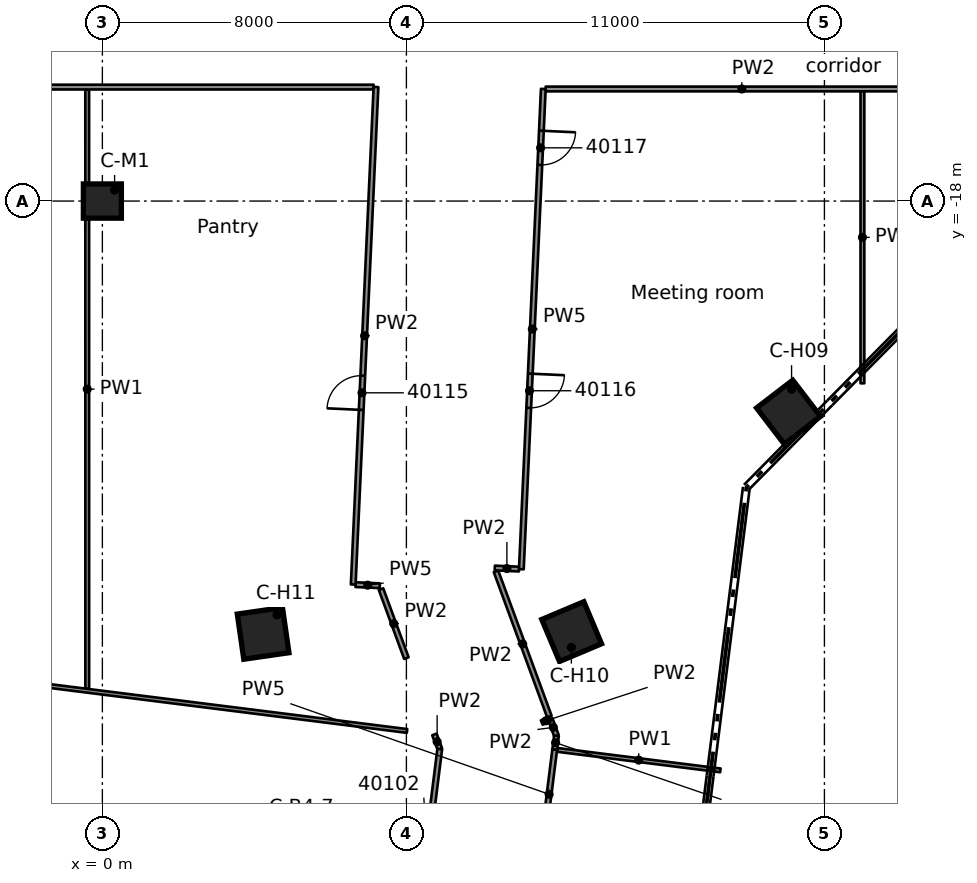
"""IFC4 building model, lengths in metres.
Left out: names, types, materials, properties, quantities, classifications, styles, units other than length and angle.
Written with IfcOpenShell. Run it as: python <this file> out.ifc"""

import sys

from ifc_helpers import new_model, si_unit, direction, frame, frame_2d, origin, origin_2d, place, context, subcontext, project, spatial, rectangle, extrude, element, fill, save


model = new_model("IFC4")
c1 = context("Model", 3, precision=1e-05, world=origin(), true_north=direction((0.0, 1.0)))
c2 = subcontext(c1, "Body", "Model", "MODEL_VIEW")
j1 = project(units=[si_unit("LENGTHUNIT", "METRE"), si_unit("PLANEANGLEUNIT", "RADIAN")], contexts=[c1])
p1 = place(None, origin())
s1 = spatial("IfcSite", under=j1, at=p1, CompositionType="ELEMENT")
p2 = place(p1, origin())
s2 = spatial("IfcBuilding", under=s1, at=p2, CompositionType="ELEMENT")
p3 = place(p2, frame((0.0, 0.0, 199.1)))
s3 = spatial("IfcBuildingStorey", under=s2, at=p3, CompositionType="ELEMENT", Elevation=199.1)
for number, where, z_axis, x_axis in (
    (1, (18.056, -23.555, 0.0), (0.0, 0.0, 1.0), (0.608, -0.794, 0.0)),
    (2, (12.349, -29.329, 0.0), (0.0, 0.0, 1.0), (0.388, -0.922, 0.0)),
    (3, (4.23, -29.376, 0.0), (0.0, 0.0, 1.0), (0.143, -0.99, 0.0)),
):
    element("IfcColumn", number, at=place(p3, frame(where, z_axis=z_axis, x_axis=x_axis)), inside=s3, PredefinedType="COLUMN", context=c2, shape_type="SweptSolid", body=[
        extrude(rectangle(XDim=1.2, YDim=1.2, at=origin_2d()), origin(), (0.0, 0.0, 1.0), 3.5),
    ])
p4 = place(p3, frame((0.0, -18.0, 0.0), z_axis=(0.0, 0.0, 1.0), x_axis=(1.0, 0.0, 0.0)))
e4 = element("IfcColumn", 4, at=p4, inside=s3, PredefinedType="COLUMN", context=c2, shape_type="SweptSolid", body=[
    extrude(rectangle(XDim=1.0, YDim=0.9, at=origin_2d()), origin(), (0.0, 0.0, 1.0), 3.5),
])
p5 = place(p3, frame((-0.399, -15.062, 0.0), z_axis=(0.0, 0.0, 1.0), x_axis=(6.1913754e-05, -0.999999998083, 0.0)))
e5 = element("IfcWall", 5, at=p5, inside=s3, PredefinedType="PARTITIONING", context=c2, shape_type="SweptSolid", body=[
    extrude(rectangle(XDim=15.773, YDim=0.1, at=frame_2d((7.886, 0.0))), origin(), (0.0, 0.0, 1.0), 3.03),
])
p6 = place(p3, frame((7.332, -28.21, 0.0), z_axis=(0.0, 0.0, 1.0), x_axis=(0.34522583337, -0.938519644959, 0.0)))
e6 = element("IfcWall", 6, at=p6, inside=s3, PredefinedType="PARTITIONING", context=c2, shape_type="SweptSolid", body=[
    extrude(rectangle(XDim=1.935, YDim=0.125, at=frame_2d((0.967, 0.0))), origin(), (0.0, 0.0, 1.0), 3.03),
])
p7 = place(p3, frame((8.738, -32.034, 0.0), z_axis=(0.0, 0.0, 1.0), x_axis=(0.344934891115, -0.938626614204, 0.0)))
e7 = element("IfcWall", 7, at=p7, inside=s3, PredefinedType="PARTITIONING", context=c2, shape_type="SweptSolid", body=[
    extrude(rectangle(XDim=0.411, YDim=0.125, at=frame_2d((0.206, 0.0))), origin(), (0.0, 0.0, 1.0), 3.03),
])
p8 = place(p3, frame((10.358, -27.743, 0.0), z_axis=(0.0, 0.0, 1.0), x_axis=(0.34503845991, -0.938588547332, 0.0)))
e8 = element("IfcWall", 8, at=p8, inside=s3, PredefinedType="PARTITIONING", context=c2, shape_type="SweptSolid", body=[
    extrude(rectangle(XDim=4.072, YDim=0.125, at=frame_2d((2.036, 0.0))), origin(), (0.0, 0.0, 1.0), 3.03),
])
p9 = place(p3, frame((11.786, -31.628, 0.0), z_axis=(0.0, 0.0, 1.0), x_axis=(0.346065449672, -0.938210373287, 0.0)))
e9 = element("IfcWall", 9, at=p9, inside=s3, PredefinedType="PARTITIONING", context=c2, shape_type="SweptSolid", body=[
    extrude(rectangle(XDim=0.471, YDim=0.125, at=frame_2d((0.236, 0.0))), origin(), (0.0, 0.0, 1.0), 3.03),
])
p10 = place(p3, frame((-16.315, -28.884, 0.0), z_axis=(0.0, 0.0, 1.0), x_axis=(0.992189406065, -0.124740460527, 0.0)))
e10 = element("IfcWall", 10, at=p10, inside=s3, PredefinedType="PARTITIONING", context=c2, shape_type="SweptSolid", body=[
    extrude(rectangle(XDim=24.524, YDim=0.1, at=frame_2d((12.262, 0.0))), origin(), (0.0, 0.0, 1.0), 3.03),
])
p11 = place(p3, frame((11.965, -32.44, 0.0), z_axis=(0.0, 0.0, 1.0), x_axis=(0.992194392082, -0.124700795187, 0.0)))
e11 = element("IfcWall", 11, at=p11, inside=s3, PredefinedType="PARTITIONING", context=c2, shape_type="SweptSolid", body=[
    extrude(rectangle(XDim=4.331, YDim=0.1, at=frame_2d((2.165, 0.0))), origin(), (0.0, 0.0, 1.0), 3.03),
])
p12 = place(p3, frame((6.663, -28.093, 0.0), z_axis=(0.0, 0.0, 1.0), x_axis=(0.998961422795, -0.045563974439, 0.0)))
e12 = element("IfcWall", 12, at=p12, inside=s3, PredefinedType="PARTITIONING", context=c2, shape_type="SweptSolid", body=[
    extrude(rectangle(XDim=0.638, YDim=0.125, at=frame_2d((0.319, 0.0))), origin(), (0.0, 0.0, 1.0), 2.395),
])
p13 = place(p3, frame((10.326, -27.655, 0.0), z_axis=(0.0, 0.0, 1.0), x_axis=(0.998961422795, -0.045563974439, 0.0)))
e13 = element("IfcWall", 13, at=p13, inside=s3, PredefinedType="PARTITIONING", context=c2, shape_type="SweptSolid", body=[
    extrude(rectangle(XDim=0.638, YDim=0.125, at=frame_2d((0.319, 0.0))), origin(), (0.0, 0.0, 1.0), 3.03),
])
p14 = place(p3, frame((11.665, -15.051, 0.0), z_axis=(0.0, 0.0, 1.0), x_axis=(1.0, 0.0, 0.0)))
e14 = element("IfcWall", 14, at=p14, inside=s3, PredefinedType="PARTITIONING", context=c2, shape_type="SweptSolid", body=[
    extrude(rectangle(XDim=10.323, YDim=0.125, at=frame_2d((5.162, 0.0))), origin(), (0.0, 0.0, 1.0), 3.03),
])
p15 = place(p3, frame((7.138, -15.001, 0.0), z_axis=(0.0, 0.0, 1.0), x_axis=(-1.0, 0.0, 0.0)))
e15 = element("IfcWall", 15, at=p15, inside=s3, PredefinedType="PARTITIONING", context=c2, shape_type="SweptSolid", body=[
    extrude(rectangle(XDim=18.128, YDim=0.125, at=frame_2d((9.064, 0.0))), origin(), (0.0, 0.0, 1.0), 3.03),
])
p16 = place(p15, frame((10.886, 0.0, 0.0)))
e16 = element("IfcOpeningElement", 16, at=p16, cuts=e15, PredefinedType="OPENING", context=c2, shape_type="SweptSolid", body=[
    extrude(rectangle(XDim=0.9, YDim=2.1, at=frame_2d((0.45, 1.05))), frame((0.0, 0.073, 0.0), z_axis=(0.0, -1.0, 0.0), x_axis=(1.0, 0.0, 0.0)), (0.0, 0.0, 1.0), 0.145),
])
p17 = place(p3, frame((11.563, -31.721, 0.0), z_axis=(0.0, 0.0, 1.0), x_axis=(0.921426271694, 0.3885532471, 0.0)))
e17 = element("IfcWall", 17, at=p17, inside=s3, PredefinedType="PARTITIONING", context=c2, shape_type="SweptSolid", body=[
    extrude(rectangle(XDim=0.242, YDim=0.125, at=frame_2d((0.121, 0.0))), origin(), (0.0, 0.0, 1.0), 3.03),
])
p18 = place(p3, frame((11.903, -32.432, 0.0), z_axis=(0.0, 0.0, 1.0), x_axis=(0.125847054802, 0.992049655409, 0.0)))
e18 = element("IfcWall", 18, at=p18, inside=s3, PredefinedType="PARTITIONING", context=c2, shape_type="SweptSolid", body=[
    extrude(rectangle(XDim=0.365, YDim=0.125, at=frame_2d((0.182, 0.0))), origin(), (0.0, 0.0, 1.0), 3.03),
])
p19 = place(p3, frame((11.903, -32.432, 0.0), z_axis=(0.0, 0.0, 1.0), x_axis=(-0.124726255985, -0.992191191791, 0.0)))
e19 = element("IfcWall", 19, at=p19, inside=s3, PredefinedType="PARTITIONING", context=c2, shape_type="SweptSolid", body=[
    extrude(rectangle(XDim=3.954, YDim=0.125, at=frame_2d((1.977, 0.0))), origin(), (0.0, 0.0, 1.0), 2.395),
])
p20 = place(p19, frame((1.6, 0.0, 0.0)))
e20 = element("IfcOpeningElement", 20, at=p20, cuts=e19, PredefinedType="OPENING", context=c2, shape_type="SweptSolid", body=[
    extrude(rectangle(XDim=1.0, YDim=2.1, at=frame_2d((0.5, 1.05))), frame((0.0, 0.073, 0.0), z_axis=(0.0, -1.0, 0.0), x_axis=(1.0, 0.0, 0.0)), (0.0, 0.0, 1.0), 0.145),
])
p21 = place(p3, frame((7.416, -44.066, 0.0), z_axis=(0.0, 0.0, 1.0), x_axis=(0.124521004899, 0.992216971906, 0.0)))
e21 = element("IfcWall", 21, at=p21, inside=s3, PredefinedType="PARTITIONING", context=c2, shape_type="SweptSolid", body=[
    extrude(rectangle(XDim=11.74, YDim=0.125, at=frame_2d((5.87, 0.0))), origin(), (0.0, 0.0, 1.0), 2.395),
])
p22 = place(p21, frame((8.597, 0.0, 0.0)))
e22 = element("IfcOpeningElement", 22, at=p22, cuts=e21, PredefinedType="OPENING", context=c2, shape_type="SweptSolid", body=[
    extrude(rectangle(XDim=0.9, YDim=2.1, at=frame_2d((0.45, 1.05))), frame((0.0, 0.073, 0.0), z_axis=(0.0, -1.0, 0.0), x_axis=(1.0, 0.0, 0.0)), (0.0, 0.0, 1.0), 0.145),
])
p23 = place(p21, frame((3.296, 0.0, 0.0)))
e23 = element("IfcOpeningElement", 23, at=p23, cuts=e21, PredefinedType="OPENING", context=c2, shape_type="SweptSolid", body=[
    extrude(rectangle(XDim=0.9, YDim=2.1, at=frame_2d((0.45, 1.05))), frame((0.0, 0.073, 0.0), z_axis=(0.0, -1.0, 0.0), x_axis=(1.0, 0.0, 0.0)), (0.0, 0.0, 1.0), 0.145),
])
p24 = place(p3, frame((11.603, -15.05, 0.0), z_axis=(0.0, 0.0, 1.0), x_axis=(-0.045700929941, -0.998955166663, 0.0)))
e24 = element("IfcWall", 24, at=p24, inside=s3, PredefinedType="PARTITIONING", context=c2, shape_type="SweptSolid", body=[
    extrude(rectangle(XDim=12.65, YDim=0.125, at=frame_2d((6.325, 0.0))), origin(), (0.0, 0.0, 1.0), 2.395),
])
p25 = place(p24, frame((7.499, 0.0, 0.0)))
e25 = element("IfcOpeningElement", 25, at=p25, cuts=e24, PredefinedType="OPENING", context=c2, shape_type="SweptSolid", body=[
    extrude(rectangle(XDim=0.9, YDim=2.1, at=frame_2d((0.45, 1.05))), frame((0.0, 0.073, 0.0), z_axis=(0.0, -1.0, 0.0), x_axis=(1.0, 0.0, 0.0)), (0.0, 0.0, 1.0), 0.145),
])
p26 = place(p24, frame((1.101, 0.0, 0.0)))
e26 = element("IfcOpeningElement", 26, at=p26, cuts=e24, PredefinedType="OPENING", context=c2, shape_type="SweptSolid", body=[
    extrude(rectangle(XDim=0.9, YDim=2.1, at=frame_2d((0.45, 1.05))), frame((0.0, 0.073, 0.0), z_axis=(0.0, -1.0, 0.0), x_axis=(1.0, 0.0, 0.0)), (0.0, 0.0, 1.0), 0.145),
])
p27 = place(p3, frame((6.601, -28.09, 0.0), z_axis=(0.0, 0.0, 1.0), x_axis=(0.045702609905, 0.998955089805, 0.0)))
e27 = element("IfcWall", 27, at=p27, inside=s3, PredefinedType="PARTITIONING", context=c2, shape_type="SweptSolid", body=[
    extrude(rectangle(XDim=13.104, YDim=0.125, at=frame_2d((6.552, 0.0))), origin(), (0.0, 0.0, 1.0), 3.03),
])
p28 = place(p27, frame((4.6, 0.0, 0.0)))
e28 = element("IfcOpeningElement", 28, at=p28, cuts=e27, PredefinedType="OPENING", context=c2, shape_type="SweptSolid", body=[
    extrude(rectangle(XDim=0.9, YDim=2.1, at=frame_2d((0.45, 1.05))), frame((0.0, 0.073, 0.0), z_axis=(0.0, -1.0, 0.0), x_axis=(1.0, 0.0, 0.0)), (0.0, 0.0, 1.0), 0.145),
])
p29 = place(p3, frame((20.0, -22.796, 0.0), z_axis=(0.0, 0.0, 1.0), x_axis=(0.0, 1.0, 0.0)))
e29 = element("IfcWall", 29, at=p29, inside=s3, PredefinedType="PARTITIONING", context=c2, shape_type="SweptSolid", body=[
    extrude(rectangle(XDim=7.682, YDim=0.1, at=frame_2d((3.841, 0.0))), origin(), (0.0, 0.0, 1.0), 2.395),
])
p30 = place(p28, origin())
e30 = element("IfcDoor", 30, at=p30, inside=s3, OperationType="SINGLE_SWING_LEFT", PredefinedType="DOOR", context=c2, shape_type="SweptSolid", body=[
    extrude(rectangle(XDim=0.9, YDim=2.1, at=frame_2d((0.45, 1.05))), frame((0.0, 0.025, 0.0), z_axis=(0.0, -1.0, 0.0), x_axis=(1.0, 0.0, 0.0)), (0.0, 0.0, 1.0), 0.05),
])
fill(e28, e30)
p31 = place(p25, origin())
e31 = element("IfcDoor", 31, at=p31, inside=s3, OperationType="SINGLE_SWING_RIGHT", PredefinedType="DOOR", context=c2, shape_type="SweptSolid", body=[
    extrude(rectangle(XDim=0.9, YDim=2.1, at=frame_2d((0.45, 1.05))), frame((0.0, 0.025, 0.0), z_axis=(0.0, -1.0, 0.0), x_axis=(1.0, 0.0, 0.0)), (0.0, 0.0, 1.0), 0.05),
])
fill(e25, e31)
p32 = place(p26, origin())
e32 = element("IfcDoor", 32, at=p32, inside=s3, OperationType="SINGLE_SWING_LEFT", PredefinedType="DOOR", context=c2, shape_type="SweptSolid", body=[
    extrude(rectangle(XDim=0.9, YDim=2.1, at=frame_2d((0.45, 1.05))), frame((0.0, 0.025, 0.0), z_axis=(0.0, -1.0, 0.0), x_axis=(1.0, 0.0, 0.0)), (0.0, 0.0, 1.0), 0.05),
])
fill(e26, e32)
save(model, sys.argv[1])
